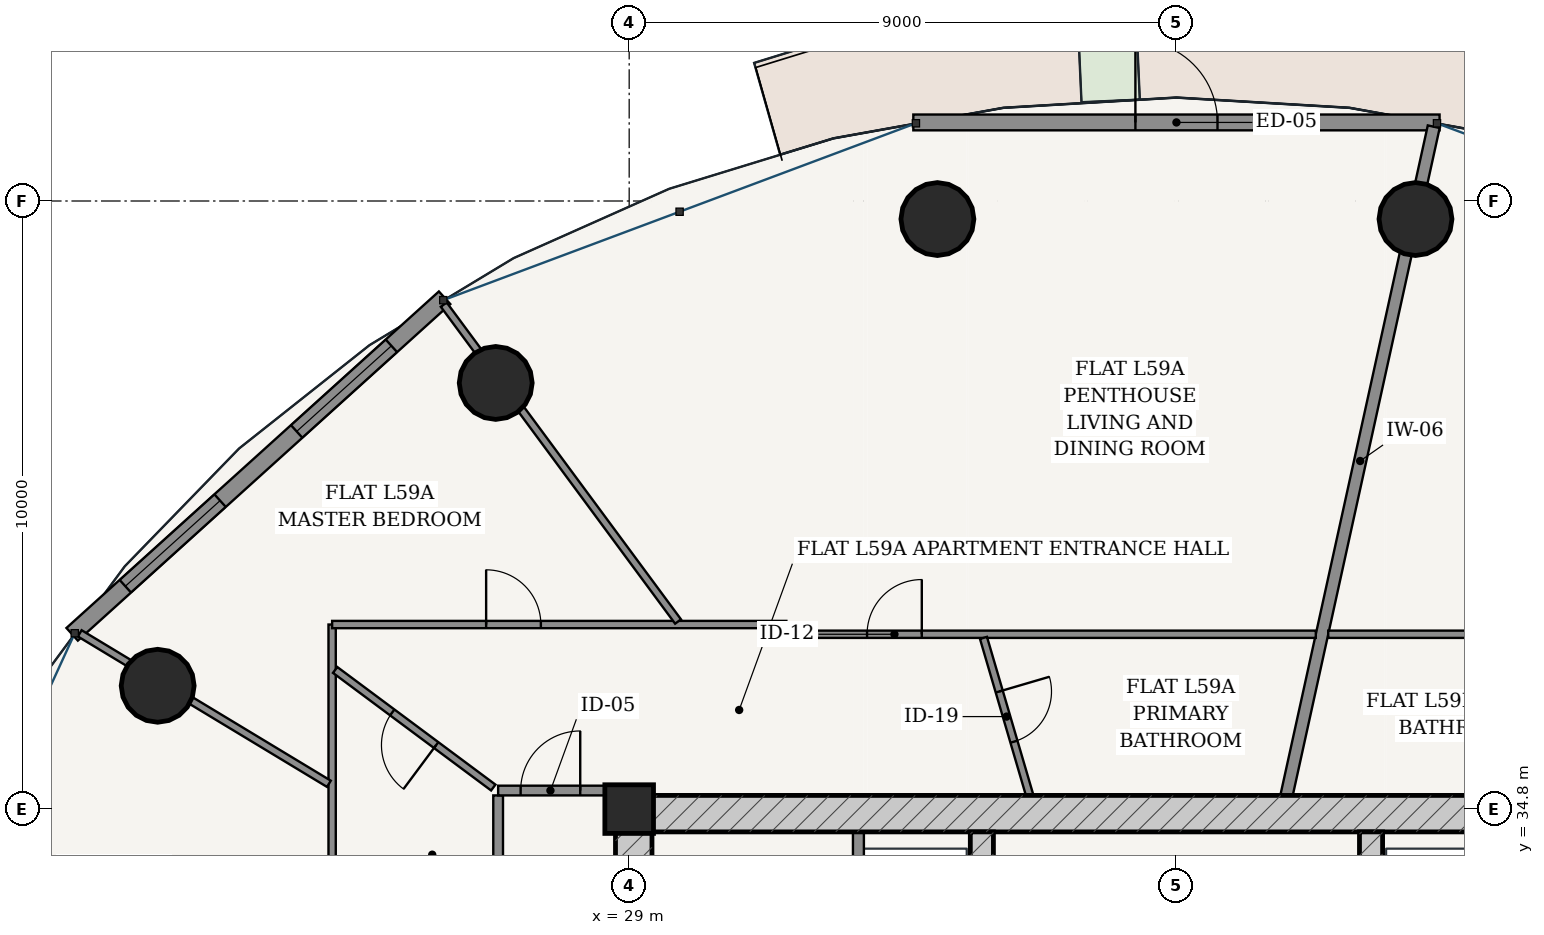
"""IFC4 building model, lengths in metres.
Left out: names, types, materials, properties, quantities, classifications, styles, units other than length and angle.
Written with IfcOpenShell. Run it as: python <this file> out.ifc"""

import sys

from ifc_helpers import new_model, si_unit, direction, frame, frame_2d, origin, origin_2d, place, context, subcontext, project, spatial, rectangle, hollow_circle, extrude, source, transform, mapped, element, fill, save


model = new_model("IFC4")
c1 = context("Model", 3, precision=1e-05, world=origin(), true_north=direction((-0.2419218956, 0.970295726276)))
c2 = subcontext(c1, "Body", "Model", "MODEL_VIEW")
j1 = project(units=[si_unit("LENGTHUNIT", "METRE"), si_unit("PLANEANGLEUNIT", "RADIAN")], contexts=[c1])
p1 = place(None, origin())
s1 = spatial("IfcSite", under=j1, at=p1, CompositionType="ELEMENT")
p2 = place(p1, origin())
s2 = spatial("IfcBuilding", under=s1, at=p2, CompositionType="ELEMENT")
p3 = place(p2, frame((0.0, 0.0, 224.5)))
s3 = spatial("IfcBuildingStorey", under=s2, at=p3, CompositionType="ELEMENT", Elevation=224.5)
p4 = place(p3, frame((29.0, 34.8, 0.0), z_axis=(0.0, 0.0, 1.0), x_axis=(1.0, 0.0, 0.0)))
e1 = element("IfcColumn", 1, at=p4, inside=s3, PredefinedType="COLUMN", context=c2, shape_type="SweptSolid", body=[
    extrude(rectangle(XDim=0.8, YDim=0.8, at=origin_2d()), origin(), (0.0, 0.0, 1.0), 3.7),
])
p5 = place(p3, frame((28.775, 34.725, 0.0), z_axis=(0.0, 0.0, 1.0), x_axis=(1.0, 0.0, 0.0)))
e2 = element("IfcWall", 2, at=p5, inside=s3, PredefinedType="SHEAR", context=c2, shape_type="SweptSolid", body=[
    extrude(rectangle(XDim=18.45, YDim=0.6, at=frame_2d((9.225, 0.0))), origin(), (0.0, 0.0, 1.0), 3.435),
])
p6 = place(p3, frame((29.075, 19.175, 0.0), z_axis=(0.0, 0.0, 1.0), x_axis=(0.0, 1.0, 0.0)))
e3 = element("IfcWall", 3, at=p6, inside=s3, PredefinedType="SHEAR", context=c2, shape_type="SweptSolid", body=[
    extrude(rectangle(XDim=15.25, YDim=0.6, at=frame_2d((7.625, 0.0))), origin(), (0.0, 0.0, 1.0), 3.435),
])
p7 = place(p6, frame((9.875, 0.0, 0.0)))
e4 = element("IfcOpeningElement", 4, at=p7, cuts=e3, PredefinedType="OPENING", context=c2, shape_type="SweptSolid", body=[
    extrude(rectangle(XDim=1.5, YDim=2.2, at=frame_2d((0.75, 1.1))), frame((0.0, 0.31, 0.0), z_axis=(0.0, -1.0, 0.0), x_axis=(1.0, 0.0, 0.0)), (0.0, 0.0, 1.0), 0.62),
])
p8 = place(p3, frame((34.8, 19.175, 0.0), z_axis=(0.0, 0.0, 1.0), x_axis=(0.0, 1.0, 0.0)))
e5 = element("IfcWall", 5, at=p8, inside=s3, PredefinedType="SHEAR", context=c2, shape_type="SweptSolid", body=[
    extrude(rectangle(XDim=15.25, YDim=0.38, at=frame_2d((7.625, 0.0))), origin(), (0.0, 0.0, 1.0), 3.435),
])
p9 = place(p8, frame((7.8, 0.0, 0.0)))
e6 = element("IfcOpeningElement", 6, at=p9, cuts=e5, PredefinedType="OPENING", context=c2, shape_type="SweptSolid", body=[
    extrude(rectangle(XDim=1.05, YDim=2.15, at=frame_2d((0.525, 1.075))), frame((0.0, 0.2, 0.0), z_axis=(0.0, -1.0, 0.0), x_axis=(1.0, 0.0, 0.0)), (0.0, 0.0, 1.0), 0.4),
])
p10 = place(p3, frame((41.2, 19.175, 0.0), z_axis=(0.0, 0.0, 1.0), x_axis=(0.0, 1.0, 0.0)))
e7 = element("IfcWall", 7, at=p10, inside=s3, PredefinedType="SHEAR", context=c2, shape_type="SweptSolid", body=[
    extrude(rectangle(XDim=15.25, YDim=0.38, at=frame_2d((7.625, 0.0))), origin(), (0.0, 0.0, 1.0), 3.435),
])
p11 = place(p10, frame((7.8, 0.0, 0.0)))
e8 = element("IfcOpeningElement", 8, at=p11, cuts=e7, PredefinedType="OPENING", context=c2, shape_type="SweptSolid", body=[
    extrude(rectangle(XDim=1.05, YDim=2.15, at=frame_2d((0.525, 1.075))), frame((0.0, 0.2, 0.0), z_axis=(0.0, -1.0, 0.0), x_axis=(1.0, 0.0, 0.0)), (0.0, 0.0, 1.0), 0.4),
])
for number, where, z_axis, x_axis in (
    (9, (41.931, 44.503, 0.0), (0.0, 0.0, 1.0), (1.0, 0.0, 0.0)),
    (10, (34.069, 44.503, 0.0), (0.0, 0.0, 1.0), (1.0, 0.0, 0.0)),
    (11, (26.805, 41.808, 0.0), (0.0, 0.0, 1.0), (1.0, 0.0, 0.0)),
    (12, (21.246, 36.828, 0.0), (0.0, 0.0, 1.0), (1.0, 0.0, 0.0)),
):
    element("IfcColumn", number, at=place(p3, frame(where, z_axis=z_axis, x_axis=x_axis)), inside=s3, PredefinedType="COLUMN", context=c2, shape_type="SweptSolid", body=[
        extrude(hollow_circle(Radius=0.6, WallThickness=0.038, at=origin_2d()), origin(), (0.0, 0.0, 1.0), 3.7),
    ])
p12 = place(p3, frame((42.327, 46.092, 0.0), z_axis=(0.0, 0.0, 1.0), x_axis=(-1.0, 0.0, 0.0)))
e13 = element("IfcWall", 13, at=p12, inside=s3, PredefinedType="SOLIDWALL", context=c2, shape_type="SweptSolid", body=[
    extrude(rectangle(XDim=8.654, YDim=0.26, at=frame_2d((4.327, 0.0))), origin(), (0.0, 0.0, 1.0), 3.435),
])
p13 = place(p12, frame((3.652, 0.0, 0.0)))
e14 = element("IfcOpeningElement", 14, at=p13, cuts=e13, PredefinedType="OPENING", context=c2, shape_type="SweptSolid", body=[
    extrude(rectangle(XDim=1.35, YDim=2.2, at=frame_2d((0.675, 1.1))), frame((0.0, 0.14, 0.0), z_axis=(0.0, -1.0, 0.0), x_axis=(1.0, 0.0, 0.0)), (0.0, 0.0, 1.0), 0.28),
])
p14 = place(p3, frame((25.965, 43.209, 0.0), z_axis=(0.0, 0.0, 1.0), x_axis=(-0.741972126783, -0.670430729514, 0.0)))
e15 = element("IfcWall", 15, at=p14, inside=s3, PredefinedType="SOLIDWALL", context=c2, shape_type="SweptSolid", body=[
    extrude(rectangle(XDim=8.255, YDim=0.28, at=frame_2d((4.127, 0.0))), origin(), (0.0, 0.0, 1.0), 3.435),
])
p15 = place(p14, frame((1.179, 0.0, 0.85)))
e16 = element("IfcOpeningElement", 16, at=p15, cuts=e15, PredefinedType="OPENING", context=c2, shape_type="SweptSolid", body=[
    extrude(rectangle(XDim=2.1, YDim=1.95, at=frame_2d((1.05, 0.975))), frame((0.0, 0.15, 0.0), z_axis=(0.0, -1.0, 0.0), x_axis=(1.0, 0.0, 0.0)), (0.0, 0.0, 1.0), 0.3),
])
p16 = place(p14, frame((4.976, 0.0, 0.85)))
e17 = element("IfcOpeningElement", 17, at=p16, cuts=e15, PredefinedType="OPENING", context=c2, shape_type="SweptSolid", body=[
    extrude(rectangle(XDim=2.1, YDim=1.95, at=frame_2d((1.05, 0.975))), frame((0.0, 0.15, 0.0), z_axis=(0.0, -1.0, 0.0), x_axis=(1.0, 0.0, 0.0)), (0.0, 0.0, 1.0), 0.3),
])
p17 = place(p3, frame((32.77, 28.52, 0.0), z_axis=(0.0, 0.0, 1.0), x_axis=(0.0, 1.0, 0.0)))
e18 = element("IfcWall", 18, at=p17, inside=s3, PredefinedType="PARTITIONING", context=c2, shape_type="SweptSolid", body=[
    extrude(rectangle(XDim=5.905, YDim=0.18, at=frame_2d((2.953, 0.0))), origin(), (0.0, 0.0, 1.0), 3.435),
])
p18 = place(p17, frame((3.655, 0.0, 0.0)))
e19 = element("IfcOpeningElement", 19, at=p18, cuts=e18, PredefinedType="OPENING", context=c2, shape_type="SweptSolid", body=[
    extrude(rectangle(XDim=1.15, YDim=2.2, at=frame_2d((0.575, 1.1))), frame((0.0, 0.1, 0.0), z_axis=(0.0, -1.0, 0.0), x_axis=(1.0, 0.0, 0.0)), (0.0, 0.0, 1.0), 0.2),
])
p19 = place(p17, frame((0.73, 0.0, 0.0)))
e20 = element("IfcOpeningElement", 20, at=p19, cuts=e18, PredefinedType="OPENING", context=c2, shape_type="SweptSolid", body=[
    extrude(rectangle(XDim=1.2, YDim=2.25, at=frame_2d((0.6, 1.125))), frame((0.0, 0.1, 0.0), z_axis=(0.0, -1.0, 0.0), x_axis=(1.0, 0.0, 0.0)), (0.0, 0.0, 1.0), 0.2),
])
p20 = place(p3, frame((26.845, 24.4, 0.0), z_axis=(0.0, 0.0, 1.0), x_axis=(0.0, 1.0, 0.0)))
e21 = element("IfcWall", 21, at=p20, inside=s3, PredefinedType="PARTITIONING", context=c2, shape_type="SweptSolid", body=[
    extrude(rectangle(XDim=10.625, YDim=0.16, at=frame_2d((5.312, 0.0))), origin(), (0.0, 0.0, 1.0), 2.951),
])
p21 = place(p3, frame((26.845, 35.105, 0.0), z_axis=(0.0, 0.0, 1.0), x_axis=(1.0, 0.0, 0.0)))
e22 = element("IfcWall", 22, at=p21, inside=s3, PredefinedType="PARTITIONING", context=c2, shape_type="SweptSolid", body=[
    extrude(rectangle(XDim=1.93, YDim=0.16, at=frame_2d((0.965, 0.0))), origin(), (0.0, 0.0, 1.0), 3.435),
])
p22 = place(p21, frame((0.37, 0.0, 0.0)))
e23 = element("IfcOpeningElement", 23, at=p22, cuts=e22, PredefinedType="OPENING", context=c2, shape_type="SweptSolid", body=[
    extrude(rectangle(XDim=0.98, YDim=2.2, at=frame_2d((0.49, 1.1))), frame((0.0, 0.09, 0.0), z_axis=(0.0, -1.0, 0.0), x_axis=(1.0, 0.0, 0.0)), (0.0, 0.0, 1.0), 0.18),
])
p23 = place(p3, frame((39.811, 35.027, 0.0), z_axis=(0.0, 0.0, 1.0), x_axis=(0.214966857327, 0.976621344356, 0.0)))
e24 = element("IfcWall", 24, at=p23, inside=s3, PredefinedType="PARTITIONING", context=c2, shape_type="SweptSolid", body=[
    extrude(rectangle(XDim=11.258, YDim=0.2, at=frame_2d((5.629, 0.0))), origin(), (0.0, 0.0, 1.0), 2.52),
])
p24 = place(p3, frame((24.115, 21.59, 0.0), z_axis=(0.0, 0.0, 1.0), x_axis=(0.0, 1.0, 0.0)))
e25 = element("IfcWall", 25, at=p24, inside=s3, PredefinedType="PARTITIONING", context=c2, shape_type="SweptSolid", body=[
    extrude(rectangle(XDim=16.245, YDim=0.12, at=frame_2d((8.123, 0.0))), origin(), (0.0, 0.0, 1.0), 2.951),
])
p25 = place(p24, frame((10.733, 0.0, 0.0)))
e26 = element("IfcOpeningElement", 26, at=p25, cuts=e25, PredefinedType="OPENING", context=c2, shape_type="SweptSolid", body=[
    extrude(rectangle(XDim=0.9, YDim=2.15, at=frame_2d((0.45, 1.075))), frame((0.0, 0.07, 0.0), z_axis=(0.0, -1.0, 0.0), x_axis=(1.0, 0.0, 0.0)), (0.0, 0.0, 1.0), 0.14),
])
p26 = place(p3, frame((24.115, 37.835, 0.0), z_axis=(0.0, 0.0, 1.0), x_axis=(1.0, 0.0, 0.0)))
e27 = element("IfcWall", 27, at=p26, inside=s3, PredefinedType="PARTITIONING", context=c2, shape_type="SweptSolid", body=[
    extrude(rectangle(XDim=7.47, YDim=0.12, at=frame_2d((3.735, 0.0))), origin(), (0.0, 0.0, 1.0), 2.951),
])
p27 = place(p26, frame((2.533, 0.0, 0.0)))
e28 = element("IfcOpeningElement", 28, at=p27, cuts=e27, PredefinedType="OPENING", context=c2, shape_type="SweptSolid", body=[
    extrude(rectangle(XDim=0.9, YDim=2.15, at=frame_2d((0.45, 1.075))), frame((0.0, 0.07, 0.0), z_axis=(0.0, -1.0, 0.0), x_axis=(1.0, 0.0, 0.0)), (0.0, 0.0, 1.0), 0.14),
])
p28 = place(p3, frame((31.585, 37.675, 0.0), z_axis=(0.0, 0.0, 1.0), x_axis=(1.0, 0.0, 0.0)))
e29 = element("IfcWall", 29, at=p28, inside=s3, PredefinedType="PARTITIONING", context=c2, shape_type="SweptSolid", body=[
    extrude(rectangle(XDim=8.707, YDim=0.12, at=frame_2d((4.354, 0.0))), origin(), (0.0, 0.0, 1.0), 2.951),
])
p29 = place(p28, frame((1.327, 0.0, 0.0)))
e30 = element("IfcOpeningElement", 30, at=p29, cuts=e29, PredefinedType="OPENING", context=c2, shape_type="SweptSolid", body=[
    extrude(rectangle(XDim=0.9, YDim=2.15, at=frame_2d((0.45, 1.075))), frame((0.0, 0.07, 0.0), z_axis=(0.0, -1.0, 0.0), x_axis=(1.0, 0.0, 0.0)), (0.0, 0.0, 1.0), 0.14),
])
p30 = place(p3, frame((29.804, 37.885, 0.0), z_axis=(0.0, 0.0, 1.0), x_axis=(-0.594507557292, 0.804090022524, 0.0)))
e31 = element("IfcWall", 31, at=p30, inside=s3, PredefinedType="PARTITIONING", context=c2, shape_type="SweptSolid", body=[
    extrude(rectangle(XDim=6.481, YDim=0.12, at=frame_2d((3.241, 0.0))), origin(), (0.0, 0.0, 1.0), 2.951),
])
p31 = place(p3, frame((24.062, 35.216, 0.0), z_axis=(0.0, 0.0, 1.0), x_axis=(-0.856058483833, 0.516878972543, 0.0)))
e32 = element("IfcWall", 32, at=p31, inside=s3, PredefinedType="PARTITIONING", context=c2, shape_type="SweptSolid", body=[
    extrude(rectangle(XDim=4.787, YDim=0.12, at=frame_2d((2.393, 0.0))), origin(), (0.0, 0.0, 1.0), 2.951),
])
p32 = place(p3, frame((35.586, 35.027, 0.0), z_axis=(0.0, 0.0, 1.0), x_axis=(-0.281539118681, 0.959549751004, 0.0)))
e33 = element("IfcWall", 33, at=p32, inside=s3, PredefinedType="PARTITIONING", context=c2, shape_type="SweptSolid", body=[
    extrude(rectangle(XDim=2.698, YDim=0.12, at=frame_2d((1.349, 0.0))), origin(), (0.0, 0.0, 1.0), 2.52),
])
p33 = place(p32, frame((0.919, 0.0, 0.0)))
e34 = element("IfcOpeningElement", 34, at=p33, cuts=e33, PredefinedType="OPENING", context=c2, shape_type="SweptSolid", body=[
    extrude(rectangle(XDim=0.86, YDim=2.15, at=frame_2d((0.43, 1.075))), frame((0.0, 0.07, 0.0), z_axis=(0.0, -1.0, 0.0), x_axis=(1.0, 0.0, 0.0)), (0.0, 0.0, 1.0), 0.14),
])
p34 = place(p3, frame((26.765, 35.154, 0.0), z_axis=(0.0, 0.0, 1.0), x_axis=(-0.802434587752, 0.596740087793, 0.0)))
e35 = element("IfcWall", 35, at=p34, inside=s3, PredefinedType="PARTITIONING", context=c2, shape_type="SweptSolid", body=[
    extrude(rectangle(XDim=3.24, YDim=0.12, at=frame_2d((1.62, 0.0))), origin(), (0.0, 0.0, 1.0), 3.11),
])
p35 = place(p34, frame((1.17, 0.0, 0.0)))
e36 = element("IfcOpeningElement", 36, at=p35, cuts=e35, PredefinedType="OPENING", context=c2, shape_type="SweptSolid", body=[
    extrude(rectangle(XDim=0.9, YDim=2.15, at=frame_2d((0.45, 1.075))), frame((0.0, 0.07, 0.0), z_axis=(0.0, -1.0, 0.0), x_axis=(1.0, 0.0, 0.0)), (0.0, 0.0, 1.0), 0.14),
])
p36 = place(p3, frame((40.496, 37.675, 0.0), z_axis=(0.0, 0.0, 1.0), x_axis=(1.0, 0.0, 0.0)))
e37 = element("IfcWall", 37, at=p36, inside=s3, PredefinedType="PARTITIONING", context=c2, shape_type="SweptSolid", body=[
    extrude(rectangle(XDim=3.919, YDim=0.12, at=frame_2d((1.959, 0.0))), origin(), (0.0, 0.0, 1.0), 2.951),
])
m1 = source(origin(), c2, "Body", "SweptSolid", [
    extrude(rectangle(XDim=1.35, YDim=2.2, at=frame_2d((0.675, 1.1))), frame((0.0, 0.025, 0.0), z_axis=(0.0, -1.0, 0.0), x_axis=(1.0, 0.0, 0.0)), (0.0, 0.0, 1.0), 0.05),
])
p37 = place(p13, frame((1.35, 0.0, 0.0), z_axis=(0.0, 0.0, 1.0), x_axis=(-1.0, 0.0, 0.0)))
e38 = element("IfcDoor", 38, at=p37, inside=s3, OperationType="SINGLE_SWING_LEFT", PredefinedType="DOOR", context=c2, shape_type="MappedRepresentation", body=[
    mapped(m1, transform((0.0, 0.0, 0.0), scale=1.0)),
])
fill(e14, e38)
m2 = source(origin(), c2, "Body", "SweptSolid", [
    extrude(rectangle(XDim=2.1, YDim=1.95, at=frame_2d((1.05, 0.975))), frame((0.0, 0.03, 0.0), z_axis=(0.0, -1.0, 0.0), x_axis=(1.0, 0.0, 0.0)), (0.0, 0.0, 1.0), 0.06),
])
p38 = place(p15, origin())
e39 = element("IfcWindow", 39, at=p38, inside=s3, PartitioningType="SINGLE_PANEL", PredefinedType="WINDOW", context=c2, shape_type="MappedRepresentation", body=[
    mapped(m2, transform((0.0, 0.0, 0.0), scale=1.0)),
])
fill(e16, e39)
p39 = place(p16, origin())
e40 = element("IfcWindow", 40, at=p39, inside=s3, PartitioningType="SINGLE_PANEL", PredefinedType="WINDOW", context=c2, shape_type="MappedRepresentation", body=[
    mapped(m2, transform((0.0, 0.0, 0.0), scale=1.0)),
])
fill(e17, e40)
m3 = source(origin(), c2, "Body", "SweptSolid", [
    extrude(rectangle(XDim=0.98, YDim=2.2, at=frame_2d((0.49, 1.1))), frame((0.0, 0.025, 0.0), z_axis=(0.0, -1.0, 0.0), x_axis=(1.0, 0.0, 0.0)), (0.0, 0.0, 1.0), 0.05),
])
p40 = place(p22, origin())
e41 = element("IfcDoor", 41, at=p40, inside=s3, OperationType="SINGLE_SWING_RIGHT", PredefinedType="DOOR", context=c2, shape_type="MappedRepresentation", body=[
    mapped(m3, transform((0.0, 0.0, 0.0), scale=1.0)),
])
fill(e23, e41)
m4 = source(origin(), c2, "Body", "SweptSolid", [
    extrude(rectangle(XDim=0.86, YDim=2.15, at=frame_2d((0.43, 1.075))), frame((0.0, 0.025, 0.0), z_axis=(0.0, -1.0, 0.0), x_axis=(1.0, 0.0, 0.0)), (0.0, 0.0, 1.0), 0.05),
])
p41 = place(p33, frame((0.86, 0.0, 0.0), z_axis=(0.0, 0.0, 1.0), x_axis=(-1.0, 0.0, 0.0)))
e42 = element("IfcDoor", 42, at=p41, inside=s3, OperationType="SINGLE_SWING_LEFT", PredefinedType="DOOR", context=c2, shape_type="MappedRepresentation", body=[
    mapped(m4, transform((0.0, 0.0, 0.0), scale=1.0)),
])
fill(e34, e42)
m5 = source(origin(), c2, "Body", "SweptSolid", [
    extrude(rectangle(XDim=0.9, YDim=2.15, at=frame_2d((0.45, 1.075))), frame((0.0, 0.025, 0.0), z_axis=(0.0, -1.0, 0.0), x_axis=(1.0, 0.0, 0.0)), (0.0, 0.0, 1.0), 0.05),
])
p42 = place(p29, origin())
e43 = element("IfcDoor", 43, at=p42, inside=s3, OperationType="SINGLE_SWING_RIGHT", PredefinedType="DOOR", context=c2, shape_type="MappedRepresentation", body=[
    mapped(m5, transform((0.0, 0.0, 0.0), scale=1.0)),
])
fill(e30, e43)
p43 = place(p35, origin())
e44 = element("IfcDoor", 44, at=p43, inside=s3, OperationType="SINGLE_SWING_LEFT", PredefinedType="DOOR", context=c2, shape_type="MappedRepresentation", body=[
    mapped(m5, transform((0.0, 0.0, 0.0), scale=1.0)),
])
fill(e36, e44)
p44 = place(p27, origin())
e45 = element("IfcDoor", 45, at=p44, inside=s3, OperationType="SINGLE_SWING_LEFT", PredefinedType="DOOR", context=c2, shape_type="MappedRepresentation", body=[
    mapped(m5, transform((0.0, 0.0, 0.0), scale=1.0)),
])
fill(e28, e45)
save(model, sys.argv[1])
